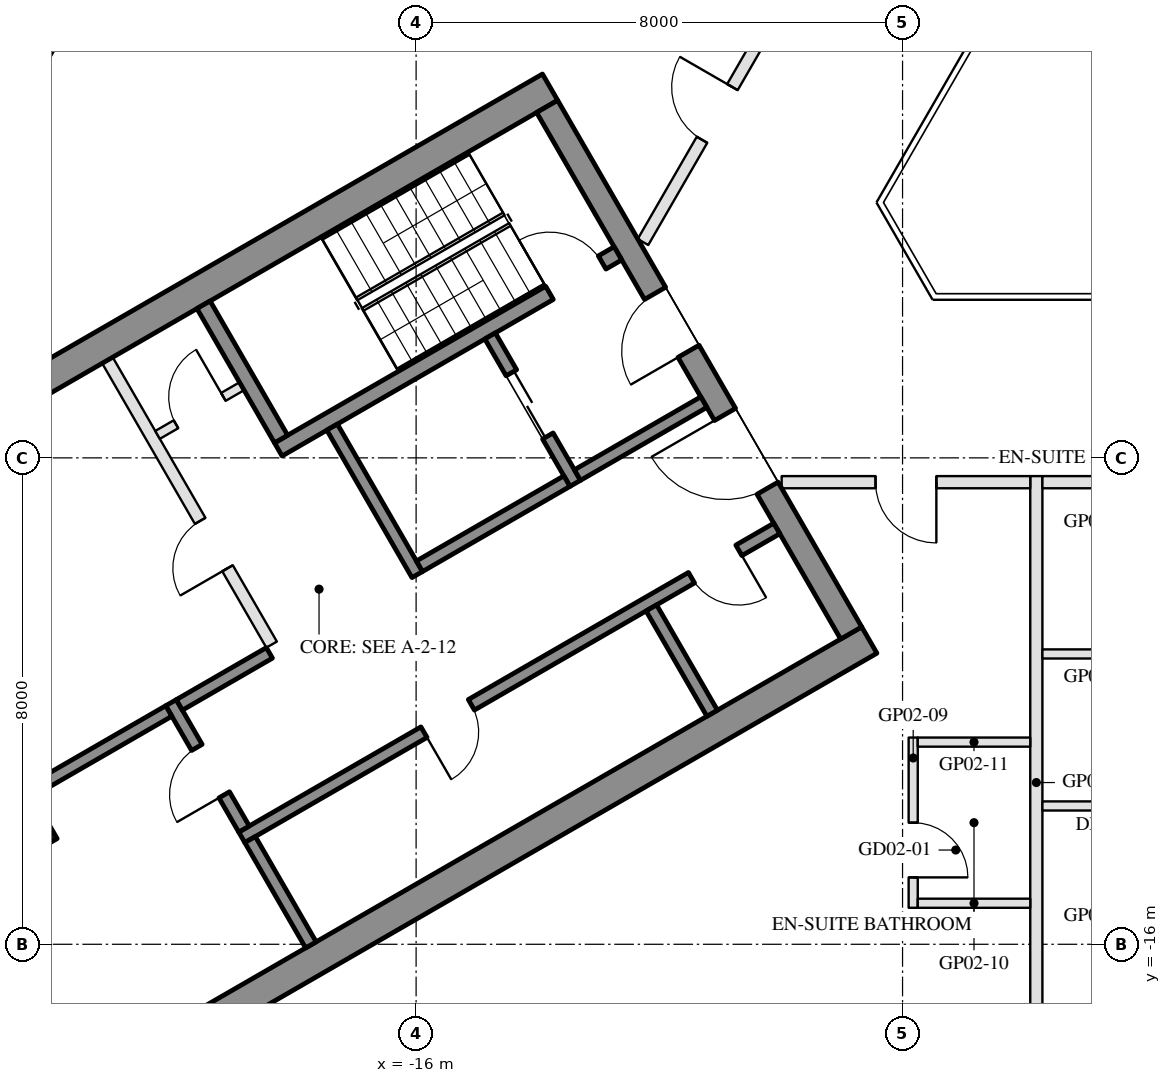
"""IFC4 building model, lengths in metres.
Left out: names, types, materials, properties, quantities, classifications, styles, units other than length and angle.
Written with IfcOpenShell. Run it as: python <this file> out.ifc"""

import sys

from ifc_helpers import new_model, si_unit, direction, frame, frame_2d, origin, origin_2d, place, context, subcontext, project, spatial, rectangle, hollow_rectangle, extrude, element, fill, save


model = new_model("IFC4")
c1 = context("Model", 3, precision=1e-05, world=origin(), true_north=direction((0.0, 1.0)))
c2 = subcontext(c1, "Body", "Model", "MODEL_VIEW")
j1 = project(units=[si_unit("LENGTHUNIT", "METRE"), si_unit("PLANEANGLEUNIT", "RADIAN")], contexts=[c1])
p1 = place(None, origin())
s1 = spatial("IfcSite", under=j1, at=p1, CompositionType="ELEMENT")
p2 = place(p1, origin())
s2 = spatial("IfcBuilding", under=s1, at=p2, CompositionType="ELEMENT")
p3 = place(p2, frame((0.0, 0.0, 57.6)))
s3 = spatial("IfcBuildingStorey", under=s2, at=p3, CompositionType="ELEMENT", Elevation=57.6)
p4 = place(p3, frame((-23.643, -13.65, 0.0), z_axis=(0.0, 0.0, 1.0), x_axis=(-0.5, 0.866025403784, 0.0)))
e1 = element("IfcColumn", 1, at=p4, inside=s3, PredefinedType="COLUMN", context=c2, shape_type="SweptSolid", body=[
    extrude(hollow_rectangle(XDim=2.8, YDim=2.4, WallThickness=0.07, at=origin_2d()), origin(), (0.0, 0.0, 1.0), 3.7),
])
p5 = place(p3, frame((-20.309, 1.934, 0.0), z_axis=(0.0, 0.0, 1.0), x_axis=(-0.499992114976, -0.866029956157, 0.0)))
e2 = element("IfcWall", 2, at=p5, inside=s3, PredefinedType="SOLIDWALL", context=c2, shape_type="SweptSolid", body=[
    extrude(rectangle(XDim=6.74, YDim=0.35, at=frame_2d((3.37, 0.0))), origin(), (0.0, 0.0, 1.0), 3.55),
])
p6 = place(p5, frame((4.02, 0.0, 0.0)))
e3 = element("IfcOpeningElement", 3, at=p6, cuts=e2, PredefinedType="OPENING", context=c2, shape_type="SweptSolid", body=[
    extrude(rectangle(XDim=2.4, YDim=2.4, at=frame_2d((1.2, 1.2))), frame((0.0, 0.185, 0.0), z_axis=(0.0, -1.0, 0.0), x_axis=(1.0, 0.0, 0.0)), (0.0, 0.0, 1.0), 0.37),
])
p7 = place(p5, frame((0.32, 0.0, 0.3)))
e4 = element("IfcOpeningElement", 4, at=p7, cuts=e2, PredefinedType="OPENING", context=c2, shape_type="SweptSolid", body=[
    extrude(rectangle(XDim=1.5, YDim=2.65, at=frame_2d((0.75, 1.325))), frame((0.0, 0.185, 0.0), z_axis=(0.0, -1.0, 0.0), x_axis=(1.0, 0.0, 0.0)), (0.0, 0.0, 1.0), 0.37),
])
p8 = place(p5, frame((2.12, 0.0, 0.3)))
e5 = element("IfcOpeningElement", 5, at=p8, cuts=e2, PredefinedType="OPENING", context=c2, shape_type="SweptSolid", body=[
    extrude(rectangle(XDim=1.5, YDim=2.65, at=frame_2d((0.75, 1.325))), frame((0.0, 0.185, 0.0), z_axis=(0.0, -1.0, 0.0), x_axis=(1.0, 0.0, 0.0)), (0.0, 0.0, 1.0), 0.37),
])
for number, where, z_axis, x_axis in (
    (6, (-13.797, -1.903, 0.0), (0.0, 0.0, 1.0), (-0.866, -0.5, 0.0)),
    (7, (-8.547, -10.997, 0.0), (0.0, 0.0, 1.0), (-0.866, -0.5, 0.0)),
):
    element("IfcWall", number, at=place(p3, frame(where, z_axis=z_axis, x_axis=x_axis)), inside=s3, PredefinedType="SHEAR", context=c2, shape_type="SweptSolid", body=[
        extrude(rectangle(XDim=14.837, YDim=0.5, at=frame_2d((7.418, 0.0))), origin(), (0.0, 0.0, 1.0), 3.5),
    ])
p9 = place(p3, frame((-13.845, -2.22, 0.0), z_axis=(0.0, 0.0, 1.0), x_axis=(0.500004234368, -0.866022959057, 0.0)))
e8 = element("IfcWall", 8, at=p9, inside=s3, PredefinedType="SHEAR", context=c2, shape_type="SweptSolid", body=[
    extrude(rectangle(XDim=10.0, YDim=0.4, at=frame_2d((5.0, 0.0))), origin(), (0.0, 0.0, 1.0), 3.5),
])
p10 = place(p9, frame((3.55, 0.0, 0.0)))
e9 = element("IfcOpeningElement", 9, at=p10, cuts=e8, PredefinedType="OPENING", context=c2, shape_type="SweptSolid", body=[
    extrude(rectangle(XDim=1.1, YDim=2.1, at=frame_2d((0.55, 1.05))), frame((0.0, 0.21, 0.0), z_axis=(0.0, -1.0, 0.0), x_axis=(1.0, 0.0, 0.0)), (0.0, 0.0, 1.0), 0.42),
])
p11 = place(p9, frame((5.85, 0.0, 0.0)))
e10 = element("IfcOpeningElement", 10, at=p11, cuts=e8, PredefinedType="OPENING", context=c2, shape_type="SweptSolid", body=[
    extrude(rectangle(XDim=1.4, YDim=2.1, at=frame_2d((0.7, 1.05))), frame((0.0, 0.21, 0.0), z_axis=(0.0, -1.0, 0.0), x_axis=(1.0, 0.0, 0.0)), (0.0, 0.0, 1.0), 0.42),
])
p12 = place(p3, frame((-12.681, -4.636, 0.0), z_axis=(0.0, 0.0, 1.0), x_axis=(-0.866021702275, -0.500006411147, 0.0)))
e11 = element("IfcWall", 11, at=p12, inside=s3, PredefinedType="SHEAR", context=c2, shape_type="SweptSolid", body=[
    extrude(rectangle(XDim=6.45, YDim=0.25, at=frame_2d((3.225, 0.0))), origin(), (0.0, 0.0, 1.0), 3.5),
])
p13 = place(p12, frame((0.3, 0.0, 0.0)))
e12 = element("IfcOpeningElement", 12, at=p13, cuts=e11, PredefinedType="OPENING", context=c2, shape_type="SweptSolid", body=[
    extrude(rectangle(XDim=1.0, YDim=2.1, at=frame_2d((0.5, 1.05))), frame((0.0, 0.135, 0.0), z_axis=(0.0, -1.0, 0.0), x_axis=(1.0, 0.0, 0.0)), (0.0, 0.0, 1.0), 0.27),
])
p14 = place(p3, frame((-19.496, -5.482, 0.0), z_axis=(0.0, 0.0, 1.0), x_axis=(0.499990435942, -0.866030925526, 0.0)))
e13 = element("IfcWall", 13, at=p14, inside=s3, PredefinedType="SHEAR", context=c2, shape_type="SweptSolid", body=[
    extrude(rectangle(XDim=2.55, YDim=0.25, at=frame_2d((1.275, 0.0))), origin(), (0.0, 0.0, 1.0), 3.5),
])
p15 = place(p3, frame((-17.381, -7.495, 0.0), z_axis=(0.0, 0.0, 1.0), x_axis=(0.500011755427, -0.866018616679, 0.0)))
e14 = element("IfcWall", 14, at=p15, inside=s3, PredefinedType="SHEAR", context=c2, shape_type="SweptSolid", body=[
    extrude(rectangle(XDim=2.8, YDim=0.2, at=frame_2d((1.4, 0.0))), origin(), (0.0, 0.0, 1.0), 3.5),
])
p16 = place(p3, frame((-14.783, -5.995, 0.0), z_axis=(0.0, 0.0, 1.0), x_axis=(0.49994636267, -0.866056369097, 0.0)))
e15 = element("IfcWall", 15, at=p16, inside=s3, PredefinedType="SHEAR", context=c2, shape_type="SweptSolid", body=[
    extrude(rectangle(XDim=2.8, YDim=0.2, at=frame_2d((1.4, 0.0))), origin(), (0.0, 0.0, 1.0), 3.5),
])
p17 = place(p16, frame((0.7, 0.0, 0.0)))
e16 = element("IfcOpeningElement", 16, at=p17, cuts=e15, PredefinedType="OPENING", context=c2, shape_type="SweptSolid", body=[
    extrude(rectangle(XDim=1.2, YDim=2.1, at=frame_2d((0.6, 1.05))), frame((0.0, 0.11, 0.0), z_axis=(0.0, -1.0, 0.0), x_axis=(1.0, 0.0, 0.0)), (0.0, 0.0, 1.0), 0.22),
])
p18 = place(p3, frame((-13.52, -8.383, 0.0), z_axis=(0.0, 0.0, 1.0), x_axis=(-0.866034573852, -0.49998411664, 0.0)))
e17 = element("IfcWall", 17, at=p18, inside=s3, PredefinedType="SHEAR", context=c2, shape_type="SweptSolid", body=[
    extrude(rectangle(XDim=2.8, YDim=0.2, at=frame_2d((1.4, 0.0))), origin(), (0.0, 0.0, 1.0), 3.5),
])
p19 = place(p3, frame((-11.268, -7.083, 0.0), z_axis=(0.0, 0.0, 1.0), x_axis=(-0.866050077142, -0.499957262057, 0.0)))
e18 = element("IfcWall", 18, at=p19, inside=s3, PredefinedType="SHEAR", context=c2, shape_type="SweptSolid", body=[
    extrude(rectangle(XDim=2.4, YDim=0.2, at=frame_2d((1.2, 0.0))), origin(), (0.0, 0.0, 1.0), 3.5),
])
p20 = place(p3, frame((-10.068, -9.162, 0.0), z_axis=(0.0, 0.0, 1.0), x_axis=(-0.866032725843, -0.499987317609, 0.0)))
e19 = element("IfcWall", 19, at=p20, inside=s3, PredefinedType="SHEAR", context=c2, shape_type="SweptSolid", body=[
    extrude(rectangle(XDim=10.16, YDim=0.2, at=frame_2d((5.08, 0.0))), origin(), (0.0, 0.0, 1.0), 3.5),
])
p21 = place(p20, frame((0.72, 0.0, 0.0)))
e20 = element("IfcOpeningElement", 20, at=p21, cuts=e19, PredefinedType="OPENING", context=c2, shape_type="SweptSolid", body=[
    extrude(rectangle(XDim=0.9, YDim=2.1, at=frame_2d((0.45, 1.05))), frame((0.0, 0.11, 0.0), z_axis=(0.0, -1.0, 0.0), x_axis=(1.0, 0.0, 0.0)), (0.0, 0.0, 1.0), 0.22),
])
p22 = place(p20, frame((5.8, 0.0, 0.0)))
e21 = element("IfcOpeningElement", 21, at=p22, cuts=e19, PredefinedType="OPENING", context=c2, shape_type="SweptSolid", body=[
    extrude(rectangle(XDim=0.9, YDim=2.1, at=frame_2d((0.45, 1.05))), frame((0.0, 0.11, 0.0), z_axis=(0.0, -1.0, 0.0), x_axis=(1.0, 0.0, 0.0)), (0.0, 0.0, 1.0), 0.22),
])
p23 = place(p3, frame((-20.031, -12.026, 0.0), z_axis=(0.0, 0.0, 1.0), x_axis=(0.500033551112, -0.866006032174, 0.0)))
e22 = element("IfcWall", 22, at=p23, inside=s3, PredefinedType="SHEAR", context=c2, shape_type="SweptSolid", body=[
    extrude(rectangle(XDim=2.4, YDim=0.2, at=frame_2d((1.2, 0.0))), origin(), (0.0, 0.0, 1.0), 3.5),
])
p24 = place(p23, frame((0.85, 0.0, 0.0)))
e23 = element("IfcOpeningElement", 23, at=p24, cuts=e22, PredefinedType="OPENING", context=c2, shape_type="SweptSolid", body=[
    extrude(rectangle(XDim=0.9, YDim=2.1, at=frame_2d((0.45, 1.05))), frame((0.0, 0.11, 0.0), z_axis=(0.0, -1.0, 0.0), x_axis=(1.0, 0.0, 0.0)), (0.0, 0.0, 1.0), 0.22),
])
p25 = place(p3, frame((-18.413, -11.208, 0.0), z_axis=(0.0, 0.0, 1.0), x_axis=(-0.866038183914, -0.499977863513, 0.0)))
e24 = element("IfcWall", 24, at=p25, inside=s3, PredefinedType="SHEAR", context=c2, shape_type="SweptSolid", body=[
    extrude(rectangle(XDim=1.71, YDim=0.2, at=frame_2d((0.855, 0.0))), origin(), (0.0, 0.0, 1.0), 3.5),
])
for number, where, z_axis, x_axis in (
    (25, (-12.131, -10.468, 0.0), (0.0, 0.0, 1.0), (0.5, -0.866, 0.0)),
    (26, (-18.73, -14.278, 0.0), (0.0, 0.0, 1.0), (0.5, -0.866, 0.0)),
):
    element("IfcWall", number, at=place(p3, frame(where, z_axis=z_axis, x_axis=x_axis)), inside=s3, PredefinedType="SHEAR", context=c2, shape_type="SweptSolid", body=[
        extrude(rectangle(XDim=2.0, YDim=0.2, at=frame_2d((1.0, 0.0))), origin(), (0.0, 0.0, 1.0), 3.5),
    ])
p26 = place(p3, frame((-20.067, -12.163, 0.0), z_axis=(0.0, 0.0, 1.0), x_axis=(-0.866060851709, -0.499938597367, 0.0)))
e27 = element("IfcWall", 27, at=p26, inside=s3, PredefinedType="SHEAR", context=c2, shape_type="SweptSolid", body=[
    extrude(rectangle(XDim=2.64, YDim=0.2, at=frame_2d((1.32, 0.0))), origin(), (0.0, 0.0, 1.0), 3.5),
])
p27 = place(p3, frame((-21.076, -6.395, 0.0), z_axis=(0.0, 0.0, 1.0), x_axis=(0.50001468107, -0.866016927499, 0.0)))
e28 = element("IfcWall", 28, at=p27, inside=s3, PredefinedType="PARTITIONING", context=c2, shape_type="SweptSolid", body=[
    extrude(rectangle(XDim=5.4, YDim=0.2, at=frame_2d((2.7, 0.0))), origin(), (0.0, 0.0, 1.0), 3.5),
])
p28 = place(p27, frame((3.05, 0.0, 0.0)))
e29 = element("IfcOpeningElement", 29, at=p28, cuts=e28, PredefinedType="OPENING", context=c2, shape_type="SweptSolid", body=[
    extrude(rectangle(XDim=0.9, YDim=2.1, at=frame_2d((0.45, 1.05))), frame((0.0, 0.11, 0.0), z_axis=(0.0, -1.0, 0.0), x_axis=(1.0, 0.0, 0.0)), (0.0, 0.0, 1.0), 0.22),
])
p29 = place(p3, frame((-18.866, -6.822, 0.0), z_axis=(0.0, 0.0, 1.0), x_axis=(-0.866028054938, -0.499995408039, 0.0)))
e30 = element("IfcWall", 30, at=p29, inside=s3, PredefinedType="PARTITIONING", context=c2, shape_type="SweptSolid", body=[
    extrude(rectangle(XDim=1.6, YDim=0.15, at=frame_2d((0.8, 0.0))), origin(), (0.0, 0.0, 1.0), 3.5),
])
p30 = place(p29, frame((0.35, 0.0, 0.0)))
e31 = element("IfcOpeningElement", 31, at=p30, cuts=e30, PredefinedType="OPENING", context=c2, shape_type="SweptSolid", body=[
    extrude(rectangle(XDim=0.9, YDim=2.1, at=frame_2d((0.45, 1.05))), frame((0.0, 0.085, 0.0), z_axis=(0.0, -1.0, 0.0), x_axis=(1.0, 0.0, 0.0)), (0.0, 0.0, 1.0), 0.17),
])
p31 = place(p3, frame((-5.8, -18.38, 0.0), z_axis=(0.0, 0.0, 1.0), x_axis=(0.0, 1.0, 0.0)))
e32 = element("IfcWall", 32, at=p31, inside=s3, PredefinedType="PARTITIONING", context=c2, shape_type="SweptSolid", body=[
    extrude(rectangle(XDim=10.08, YDim=0.2, at=frame_2d((5.04, 0.0))), origin(), (0.0, 0.0, 1.0), 2.96),
])
p32 = place(p3, frame((-5.9, -8.4, 0.0), z_axis=(0.0, 0.0, 1.0), x_axis=(-1.0, 0.0, 0.0)))
e33 = element("IfcWall", 33, at=p32, inside=s3, PredefinedType="PARTITIONING", context=c2, shape_type="SweptSolid", body=[
    extrude(rectangle(XDim=4.088, YDim=0.2, at=frame_2d((2.044, 0.0))), origin(), (0.0, 0.0, 1.0), 2.95),
])
p33 = place(p32, frame((1.544, 0.0, 0.0)))
e34 = element("IfcOpeningElement", 34, at=p33, cuts=e33, PredefinedType="OPENING", context=c2, shape_type="SweptSolid", body=[
    extrude(rectangle(XDim=1.0, YDim=2.1, at=frame_2d((0.5, 1.05))), frame((0.0, 0.11, 0.0), z_axis=(0.0, -1.0, 0.0), x_axis=(1.0, 0.0, 0.0)), (0.0, 0.0, 1.0), 0.22),
])
p34 = place(p3, frame((-7.825, -12.6, 0.0), z_axis=(0.0, 0.0, 1.0), x_axis=(0.0, -1.0, 0.0)))
e35 = element("IfcWall", 35, at=p34, inside=s3, PredefinedType="PARTITIONING", context=c2, shape_type="SweptSolid", body=[
    extrude(rectangle(XDim=2.8, YDim=0.15, at=frame_2d((1.4, 0.0))), origin(), (0.0, 0.0, 1.0), 2.95),
])
p35 = place(p34, frame((1.4, 0.0, 0.0)))
e36 = element("IfcOpeningElement", 36, at=p35, cuts=e35, PredefinedType="OPENING", context=c2, shape_type="SweptSolid", body=[
    extrude(rectangle(XDim=0.9, YDim=2.1, at=frame_2d((0.45, 1.05))), frame((0.0, 0.085, 0.0), z_axis=(0.0, -1.0, 0.0), x_axis=(1.0, 0.0, 0.0)), (0.0, 0.0, 1.0), 0.17),
])
for number, where, z_axis, x_axis in (
    (37, (-7.75, -15.325, 0.0), (0.0, 0.0, 1.0), (1.0, 0.0, 0.0)),
    (38, (-7.75, -12.675, 0.0), (0.0, 0.0, 1.0), (1.0, 0.0, 0.0)),
):
    element("IfcWall", number, at=place(p3, frame(where, z_axis=z_axis, x_axis=x_axis)), inside=s3, PredefinedType="PARTITIONING", context=c2, shape_type="SweptSolid", body=[
        extrude(rectangle(XDim=1.85, YDim=0.15, at=frame_2d((0.925, 0.0))), origin(), (0.0, 0.0, 1.0), 3.55),
    ])
p36 = place(p3, frame((2.8, -8.4, 0.0), z_axis=(0.0, 0.0, 1.0), x_axis=(-1.0, 0.0, 0.0)))
e39 = element("IfcWall", 39, at=p36, inside=s3, PredefinedType="PARTITIONING", context=c2, shape_type="SweptSolid", body=[
    extrude(rectangle(XDim=8.5, YDim=0.2, at=frame_2d((4.25, 0.0))), origin(), (0.0, 0.0, 1.0), 2.95),
])
p37 = place(p36, frame((5.05, 0.0, 0.0)))
e40 = element("IfcOpeningElement", 40, at=p37, cuts=e39, PredefinedType="OPENING", context=c2, shape_type="SweptSolid", body=[
    extrude(rectangle(XDim=1.0, YDim=2.1, at=frame_2d((0.5, 1.05))), frame((0.0, 0.11, 0.0), z_axis=(0.0, -1.0, 0.0), x_axis=(1.0, 0.0, 0.0)), (0.0, 0.0, 1.0), 0.22),
])
for number, where, z_axis, x_axis in (
    (41, (-5.7, -11.225, 0.0), (0.0, 0.0, 1.0), (1.0, 0.0, 0.0)),
    (42, (-5.7, -13.725, 0.0), (0.0, 0.0, 1.0), (1.0, 0.0, 0.0)),
):
    element("IfcWall", number, at=place(p3, frame(where, z_axis=z_axis, x_axis=x_axis)), inside=s3, PredefinedType="PARTITIONING", context=c2, shape_type="SweptSolid", body=[
        extrude(rectangle(XDim=1.85, YDim=0.15, at=frame_2d((0.925, 0.0))), origin(), (0.0, 0.0, 1.0), 2.95),
    ])
p38 = place(p3, frame((-12.269, -4.45, 0.0), z_axis=(0.0, 0.0, 1.0), x_axis=(0.500021044785, 0.866013253231, 0.0)))
e43 = element("IfcWall", 43, at=p38, inside=s3, PredefinedType="PARTITIONING", context=c2, shape_type="SweptSolid", body=[
    extrude(rectangle(XDim=4.884, YDim=0.2, at=frame_2d((2.442, 0.0))), origin(), (0.0, 0.0, 1.0), 2.95),
])
p39 = place(p38, frame((1.942, 0.0, 0.0)))
e44 = element("IfcOpeningElement", 44, at=p39, cuts=e43, PredefinedType="OPENING", context=c2, shape_type="SweptSolid", body=[
    extrude(rectangle(XDim=1.0, YDim=2.1, at=frame_2d((0.5, 1.05))), frame((0.0, 0.11, 0.0), z_axis=(0.0, -1.0, 0.0), x_axis=(1.0, 0.0, 0.0)), (0.0, 0.0, 1.0), 0.22),
])
p40 = place(p17, origin())
e45 = element("IfcDoor", 45, at=p40, inside=s3, OperationType="DOUBLE_DOOR_SLIDING", PredefinedType="DOOR", context=c2, shape_type="SweptSolid", body=[
    extrude(rectangle(XDim=1.2, YDim=2.1, at=frame_2d((0.6, 1.05))), frame((0.0, 0.025, 0.0), z_axis=(0.0, -1.0, 0.0), x_axis=(1.0, 0.0, 0.0)), (0.0, 0.0, 1.0), 0.05),
])
fill(e16, e45)
p41 = place(p30, frame((0.9, 0.0, 0.0), z_axis=(0.0, 0.0, 1.0), x_axis=(-1.0, 0.0, 0.0)))
e46 = element("IfcDoor", 46, at=p41, inside=s3, OperationType="SINGLE_SWING_RIGHT", PredefinedType="DOOR", context=c2, shape_type="SweptSolid", body=[
    extrude(rectangle(XDim=0.9, YDim=2.1, at=frame_2d((0.45, 1.05))), frame((0.0, 0.025, 0.0), z_axis=(0.0, -1.0, 0.0), x_axis=(1.0, 0.0, 0.0)), (0.0, 0.0, 1.0), 0.05),
])
fill(e31, e46)
p42 = place(p21, origin())
e47 = element("IfcDoor", 47, at=p42, inside=s3, OperationType="SINGLE_SWING_LEFT", PredefinedType="DOOR", context=c2, shape_type="SweptSolid", body=[
    extrude(rectangle(XDim=0.9, YDim=2.1, at=frame_2d((0.45, 1.05))), frame((0.0, 0.025, 0.0), z_axis=(0.0, -1.0, 0.0), x_axis=(1.0, 0.0, 0.0)), (0.0, 0.0, 1.0), 0.05),
])
fill(e20, e47)
p43 = place(p22, origin())
e48 = element("IfcDoor", 48, at=p43, inside=s3, OperationType="SINGLE_SWING_RIGHT", PredefinedType="DOOR", context=c2, shape_type="SweptSolid", body=[
    extrude(rectangle(XDim=0.9, YDim=2.1, at=frame_2d((0.45, 1.05))), frame((0.0, 0.025, 0.0), z_axis=(0.0, -1.0, 0.0), x_axis=(1.0, 0.0, 0.0)), (0.0, 0.0, 1.0), 0.05),
])
fill(e21, e48)
p44 = place(p24, frame((0.9, 0.0, 0.0), z_axis=(0.0, 0.0, 1.0), x_axis=(-1.0, 0.0, 0.0)))
e49 = element("IfcDoor", 49, at=p44, inside=s3, OperationType="SINGLE_SWING_LEFT", PredefinedType="DOOR", context=c2, shape_type="SweptSolid", body=[
    extrude(rectangle(XDim=0.9, YDim=2.1, at=frame_2d((0.45, 1.05))), frame((0.0, 0.025, 0.0), z_axis=(0.0, -1.0, 0.0), x_axis=(1.0, 0.0, 0.0)), (0.0, 0.0, 1.0), 0.05),
])
fill(e23, e49)
p45 = place(p28, frame((0.9, 0.0, 0.0), z_axis=(0.0, 0.0, 1.0), x_axis=(-1.0, 0.0, 0.0)))
e50 = element("IfcDoor", 50, at=p45, inside=s3, OperationType="SINGLE_SWING_LEFT", PredefinedType="DOOR", context=c2, shape_type="SweptSolid", body=[
    extrude(rectangle(XDim=0.9, YDim=2.1, at=frame_2d((0.45, 1.05))), frame((0.0, 0.025, 0.0), z_axis=(0.0, -1.0, 0.0), x_axis=(1.0, 0.0, 0.0)), (0.0, 0.0, 1.0), 0.05),
])
fill(e29, e50)
p46 = place(p10, frame((1.1, 0.0, 0.0), z_axis=(0.0, 0.0, 1.0), x_axis=(-1.0, 0.0, 0.0)))
e51 = element("IfcDoor", 51, at=p46, inside=s3, OperationType="SINGLE_SWING_LEFT", PredefinedType="DOOR", context=c2, shape_type="SweptSolid", body=[
    extrude(rectangle(XDim=1.1, YDim=2.1, at=frame_2d((0.55, 1.05))), frame((0.0, 0.025, 0.0), z_axis=(0.0, -1.0, 0.0), x_axis=(1.0, 0.0, 0.0)), (0.0, 0.0, 1.0), 0.05),
])
fill(e9, e51)
p47 = place(p11, frame((1.4, 0.0, 0.0), z_axis=(0.0, 0.0, 1.0), x_axis=(-1.0, 0.0, 0.0)))
e52 = element("IfcDoor", 52, at=p47, inside=s3, OperationType="DOUBLE_DOOR_SINGLE_SWING", PredefinedType="DOOR", context=c2, shape_type="SweptSolid", body=[
    extrude(rectangle(XDim=1.4, YDim=2.1, at=frame_2d((0.7, 1.05))), frame((0.0, 0.025, 0.0), z_axis=(0.0, -1.0, 0.0), x_axis=(1.0, 0.0, 0.0)), (0.0, 0.0, 1.0), 0.05),
])
fill(e10, e52)
p48 = place(p13, frame((1.0, 0.0, 0.0), z_axis=(0.0, 0.0, 1.0), x_axis=(-1.0, 0.0, 0.0)))
e53 = element("IfcDoor", 53, at=p48, inside=s3, OperationType="SINGLE_SWING_LEFT", PredefinedType="DOOR", context=c2, shape_type="SweptSolid", body=[
    extrude(rectangle(XDim=1.0, YDim=2.1, at=frame_2d((0.5, 1.05))), frame((0.0, 0.025, 0.0), z_axis=(0.0, -1.0, 0.0), x_axis=(1.0, 0.0, 0.0)), (0.0, 0.0, 1.0), 0.05),
])
fill(e12, e53)
p49 = place(p35, origin())
e54 = element("IfcDoor", 54, at=p49, inside=s3, OperationType="SINGLE_SWING_RIGHT", PredefinedType="DOOR", context=c2, shape_type="SweptSolid", body=[
    extrude(rectangle(XDim=0.9, YDim=2.1, at=frame_2d((0.45, 1.05))), frame((0.0, 0.025, 0.0), z_axis=(0.0, -1.0, 0.0), x_axis=(1.0, 0.0, 0.0)), (0.0, 0.0, 1.0), 0.05),
])
fill(e36, e54)
p50 = place(p33, origin())
e55 = element("IfcDoor", 55, at=p50, inside=s3, OperationType="SINGLE_SWING_LEFT", PredefinedType="DOOR", context=c2, shape_type="SweptSolid", body=[
    extrude(rectangle(XDim=1.0, YDim=2.1, at=frame_2d((0.5, 1.05))), frame((0.0, 0.025, 0.0), z_axis=(0.0, -1.0, 0.0), x_axis=(1.0, 0.0, 0.0)), (0.0, 0.0, 1.0), 0.05),
])
fill(e34, e55)
p51 = place(p39, origin())
e56 = element("IfcDoor", 56, at=p51, inside=s3, OperationType="SINGLE_SWING_RIGHT", PredefinedType="DOOR", context=c2, shape_type="SweptSolid", body=[
    extrude(rectangle(XDim=1.0, YDim=2.1, at=frame_2d((0.5, 1.05))), frame((0.0, 0.025, 0.0), z_axis=(0.0, -1.0, 0.0), x_axis=(1.0, 0.0, 0.0)), (0.0, 0.0, 1.0), 0.05),
])
fill(e44, e56)
save(model, sys.argv[1])
